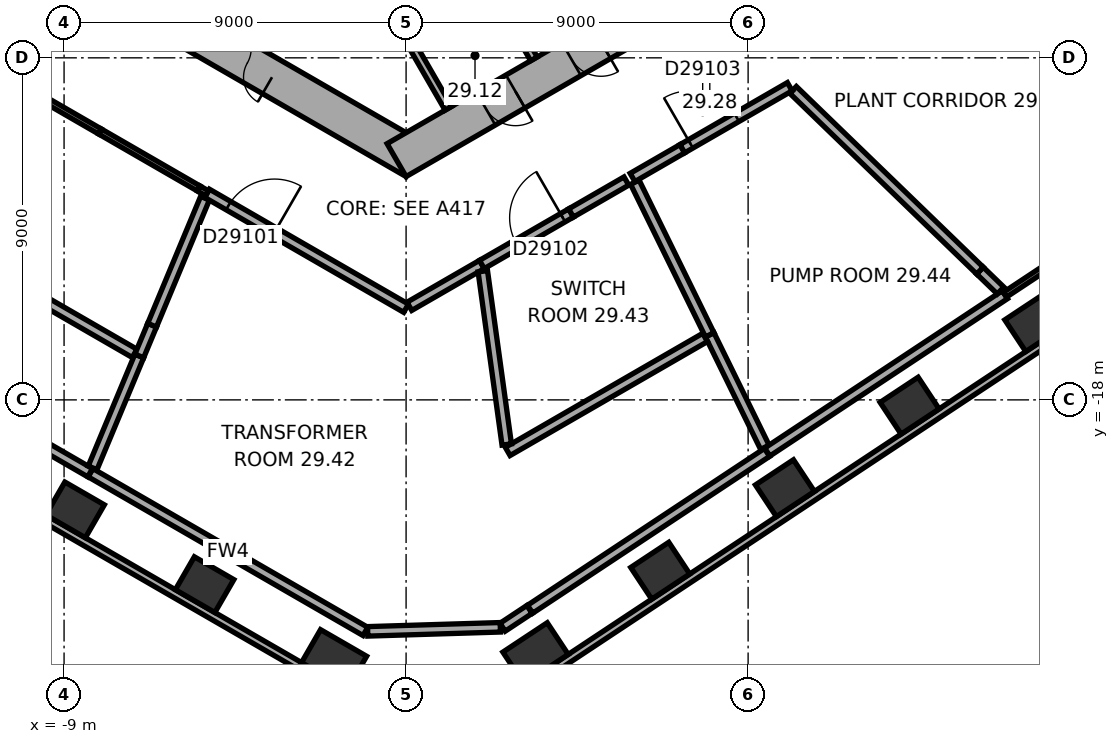
"""IFC4 building model, lengths in metres.
Left out: names, types, materials, properties, quantities, classifications, styles, units other than length and angle.
Written with IfcOpenShell. Run it as: python <this file> out.ifc"""

import sys

from ifc_helpers import new_model, si_unit, direction, frame, frame_2d, origin, origin_2d, place, context, subcontext, project, spatial, rectangle, extrude, element, fill, save


model = new_model("IFC4")
c1 = context("Model", 3, precision=1e-05, world=origin(), true_north=direction((0.0, 1.0)))
c2 = subcontext(c1, "Body", "Model", "MODEL_VIEW")
j1 = project(units=[si_unit("LENGTHUNIT", "METRE"), si_unit("PLANEANGLEUNIT", "RADIAN")], contexts=[c1])
p1 = place(None, origin())
s1 = spatial("IfcSite", under=j1, at=p1, CompositionType="ELEMENT")
p2 = place(p1, origin())
s2 = spatial("IfcBuilding", under=s1, at=p2, CompositionType="ELEMENT")
p3 = place(p2, frame((0.0, 0.0, 119.9)))
s3 = spatial("IfcBuildingStorey", under=s2, at=p3, CompositionType="ELEMENT", Elevation=119.9)
for number, where, z_axis, x_axis in (
    (1, (-8.71, -20.895, 0.0), (0.0, 0.0, 1.0), (0.866, -0.5, 0.0)),
    (2, (-5.302, -22.862, 0.0), (0.0, 0.0, 1.0), (0.866, -0.5, 0.0)),
):
    element("IfcColumn", number, at=place(p3, frame(where, z_axis=z_axis, x_axis=x_axis)), inside=s3, PredefinedType="COLUMN", context=c2, shape_type="SweptSolid", body=[
        extrude(rectangle(XDim=1.2, YDim=1.0, at=origin_2d()), origin(), (0.0, 0.0, 1.0), 4.5),
    ])
for number, where, z_axis, x_axis in (
    (3, (-1.895, -24.829, 0.0), (0.0, 0.0, 1.0), (0.866, -0.5, 0.0)),
    (4, (3.407, -24.667, 0.0), (0.0, 0.0, 1.0), (0.834, 0.552, 0.0)),
):
    element("IfcColumn", number, at=place(p3, frame(where, z_axis=z_axis, x_axis=x_axis)), inside=s3, PredefinedType="COLUMN", context=c2, shape_type="SweptSolid", body=[
        extrude(rectangle(XDim=1.4, YDim=1.0, at=origin_2d()), origin(), (0.0, 0.0, 1.0), 4.5),
    ])
for number, where, z_axis, x_axis in (
    (5, (6.688, -22.496, 0.0), (0.0, 0.0, 1.0), (0.834, 0.552, 0.0)),
    (6, (9.969, -20.324, 0.0), (0.0, 0.0, 1.0), (0.834, 0.552, 0.0)),
    (7, (13.25, -18.152, 0.0), (0.0, 0.0, 1.0), (0.834, 0.552, 0.0)),
    (8, (16.531, -15.981, 0.0), (0.0, 0.0, 1.0), (0.834, 0.552, 0.0)),
):
    element("IfcColumn", number, at=place(p3, frame(where, z_axis=z_axis, x_axis=x_axis)), inside=s3, PredefinedType="COLUMN", context=c2, shape_type="SweptSolid", body=[
        extrude(rectangle(XDim=1.2, YDim=1.0, at=origin_2d()), origin(), (0.0, 0.0, 1.0), 4.5),
    ])
p4 = place(p3, frame((-10.25, -5.629, 0.0), z_axis=(0.0, 0.0, 1.0), x_axis=(0.866022616891, -0.50000482701, 0.0)))
e9 = element("IfcWall", 9, at=p4, inside=s3, PredefinedType="SHEAR", context=c2, shape_type="SweptSolid", body=[
    extrude(rectangle(XDim=12.125, YDim=1.0, at=frame_2d((6.062, 0.0))), origin(), (0.0, 0.0, 1.0), 4.5),
])
p5 = place(p4, frame((6.262, 0.0, 0.0)))
e10 = element("IfcOpeningElement", 10, at=p5, cuts=e9, PredefinedType="OPENING", context=c2, shape_type="SweptSolid", body=[
    extrude(rectangle(XDim=1.5, YDim=2.1, at=frame_2d((0.75, 1.05))), frame((0.0, 0.51, 0.0), z_axis=(0.0, -1.0, 0.0), x_axis=(1.0, 0.0, 0.0)), (0.0, 0.0, 1.0), 1.02),
])
p6 = place(p4, frame((3.112, 0.0, 0.0)))
e11 = element("IfcOpeningElement", 11, at=p6, cuts=e9, PredefinedType="OPENING", context=c2, shape_type="SweptSolid", body=[
    extrude(rectangle(XDim=0.9, YDim=2.1, at=frame_2d((0.45, 1.05))), frame((0.0, 0.51, 0.0), z_axis=(0.0, -1.0, 0.0), x_axis=(1.0, 0.0, 0.0)), (0.0, 0.0, 1.0), 1.02),
])
p7 = place(p3, frame((-0.25, -11.691, 0.0), z_axis=(0.0, 0.0, 1.0), x_axis=(0.866022616891, 0.50000482701, 0.0)))
e12 = element("IfcWall", 12, at=p7, inside=s3, PredefinedType="SHEAR", context=c2, shape_type="SweptSolid", body=[
    extrude(rectangle(XDim=12.125, YDim=1.0, at=frame_2d((6.062, 0.0))), origin(), (0.0, 0.0, 1.0), 4.5),
])
p8 = place(p7, frame((2.712, 0.0, 0.0)))
e13 = element("IfcOpeningElement", 13, at=p8, cuts=e12, PredefinedType="OPENING", context=c2, shape_type="SweptSolid", body=[
    extrude(rectangle(XDim=0.9, YDim=2.1, at=frame_2d((0.45, 1.05))), frame((0.0, 0.51, 0.0), z_axis=(0.0, -1.0, 0.0), x_axis=(1.0, 0.0, 0.0)), (0.0, 0.0, 1.0), 1.02),
])
p9 = place(p7, frame((5.312, 0.0, 0.0)))
e14 = element("IfcOpeningElement", 14, at=p9, cuts=e12, PredefinedType="OPENING", context=c2, shape_type="SweptSolid", body=[
    extrude(rectangle(XDim=0.9, YDim=2.1, at=frame_2d((0.45, 1.05))), frame((0.0, 0.51, 0.0), z_axis=(0.0, -1.0, 0.0), x_axis=(1.0, 0.0, 0.0)), (0.0, 0.0, 1.0), 1.02),
])
p10 = place(p7, frame((7.812, 0.0, 0.0)))
e15 = element("IfcOpeningElement", 15, at=p10, cuts=e12, PredefinedType="OPENING", context=c2, shape_type="SweptSolid", body=[
    extrude(rectangle(XDim=1.1, YDim=2.1, at=frame_2d((0.55, 1.05))), frame((0.0, 0.51, 0.0), z_axis=(0.0, -1.0, 0.0), x_axis=(1.0, 0.0, 0.0)), (0.0, 0.0, 1.0), 1.02),
])
for number, where, z_axis, x_axis in (
    (16, (-19.914, -15.119, 0.0), (0.0, 0.0, 1.0), (0.866, -0.5, 0.0)),
    (17, (3.083, -25.601, 0.0), (0.0, 0.0, 1.0), (0.834, 0.552, 0.0)),
):
    element("IfcWall", number, at=place(p3, frame(where, z_axis=z_axis, x_axis=x_axis)), inside=s3, PredefinedType="STANDARD", context=c2, shape_type="SweptSolid", body=[
        extrude(rectangle(XDim=21.246, YDim=0.2, at=frame_2d((10.623, 0.0))), origin(), (0.0, 0.0, 1.0), 4.5),
    ])
for number, where, z_axis, x_axis in (
    (18, (0.013, -8.422, 0.0), (0.0, 0.0, 1.0), (0.5, -0.866, 0.0)),
    (19, (2.264, -7.122, 0.0), (0.0, 0.0, 1.0), (0.5, -0.866, 0.0)),
):
    element("IfcWall", number, at=place(p3, frame(where, z_axis=z_axis, x_axis=x_axis)), inside=s3, PredefinedType="PARTITIONING", context=c2, shape_type="SweptSolid", body=[
        extrude(rectangle(XDim=2.2, YDim=0.2, at=frame_2d((1.1, 0.0))), origin(), (0.0, 0.0, 1.0), 4.22),
    ])
p11 = place(p3, frame((-1.071, -24.093, 0.0), z_axis=(0.0, 0.0, 1.0), x_axis=(-0.866026859388, 0.499997478812, 0.0)))
e20 = element("IfcWall", 20, at=p11, inside=s3, PredefinedType="SOLIDWALL", context=c2, shape_type="SweptSolid", body=[
    extrude(rectangle(XDim=8.35, YDim=0.25, at=frame_2d((4.175, 0.0))), origin(), (0.0, 0.0, 1.0), 3.72),
])
p12 = place(p3, frame((2.479, -23.984, 0.0), z_axis=(0.0, 0.0, 1.0), x_axis=(-0.999533191385, -0.030551584573, 0.0)))
e21 = element("IfcWall", 21, at=p12, inside=s3, PredefinedType="SOLIDWALL", context=c2, shape_type="SweptSolid", body=[
    extrude(rectangle(XDim=3.492, YDim=0.25, at=frame_2d((1.746, 0.0))), origin(), (0.0, 0.0, 1.0), 4.22),
])
p13 = place(p3, frame((3.248, -23.513, 0.0), z_axis=(0.0, 0.0, 1.0), x_axis=(-0.833947775338, -0.551843372715, 0.0)))
e22 = element("IfcWall", 22, at=p13, inside=s3, PredefinedType="SOLIDWALL", context=c2, shape_type="SweptSolid", body=[
    extrude(rectangle(XDim=0.849, YDim=0.25, at=frame_2d((0.424, 0.0))), origin(), (0.0, 0.0, 1.0), 4.22),
])
p14 = place(p3, frame((-8.315, -19.916, 0.0), z_axis=(0.0, 0.0, 1.0), x_axis=(-0.866035647186, 0.499982257488, 0.0)))
e23 = element("IfcWall", 23, at=p14, inside=s3, PredefinedType="SOLIDWALL", context=c2, shape_type="SweptSolid", body=[
    extrude(rectangle(XDim=11.226, YDim=0.25, at=frame_2d((5.613, 0.0))), origin(), (0.0, 0.0, 1.0), 3.72),
])
p15 = place(p3, frame((-8.249, -19.788, 0.0), z_axis=(0.0, 0.0, 1.0), x_axis=(0.384822050218, 0.922990785255, 0.0)))
e24 = element("IfcWall", 24, at=p15, inside=s3, PredefinedType="SOLIDWALL", context=c2, shape_type="SweptSolid", body=[
    extrude(rectangle(XDim=3.187, YDim=0.25, at=frame_2d((1.594, 0.0))), origin(), (0.0, 0.0, 1.0), 3.2),
])
p16 = place(p3, frame((9.498, -19.383, 0.0), z_axis=(0.0, 0.0, 1.0), x_axis=(-0.833904576857, -0.55190864887, 0.0)))
e25 = element("IfcWall", 25, at=p16, inside=s3, PredefinedType="SOLIDWALL", context=c2, shape_type="SweptSolid", body=[
    extrude(rectangle(XDim=7.476, YDim=0.25, at=frame_2d((3.738, 0.0))), origin(), (0.0, 0.0, 1.0), 3.72),
])
p17 = place(p3, frame((9.441, -19.248, 0.0), z_axis=(0.0, 0.0, 1.0), x_axis=(-0.440358551841, 0.89782200119, 0.0)))
e26 = element("IfcWall", 26, at=p17, inside=s3, PredefinedType="SOLIDWALL", context=c2, shape_type="SweptSolid", body=[
    extrude(rectangle(XDim=3.297, YDim=0.25, at=frame_2d((1.648, 0.0))), origin(), (0.0, 0.0, 1.0), 3.2),
])
p18 = place(p3, frame((-7.143, -16.776, 0.0), z_axis=(0.0, 0.0, 1.0), x_axis=(-0.866010407637, 0.500025973189, 0.0)))
e27 = element("IfcWall", 27, at=p18, inside=s3, PredefinedType="SOLIDWALL", context=c2, shape_type="SweptSolid", body=[
    extrude(rectangle(XDim=9.376, YDim=0.25, at=frame_2d((4.688, 0.0))), origin(), (0.0, 0.0, 1.0), 4.22),
])
p19 = place(p3, frame((7.868, -16.358, 0.0), z_axis=(0.0, 0.0, 1.0), x_axis=(-0.866027641919, -0.499996123417, 0.0)))
e28 = element("IfcWall", 28, at=p19, inside=s3, PredefinedType="SOLIDWALL", context=c2, shape_type="SweptSolid", body=[
    extrude(rectangle(XDim=5.998, YDim=0.25, at=frame_2d((2.999, 0.0))), origin(), (0.0, 0.0, 1.0), 4.22),
])
p20 = place(p3, frame((7.989, -16.287, 0.0), z_axis=(0.0, 0.0, 1.0), x_axis=(-0.440340265272, 0.89783097005, 0.0)))
e29 = element("IfcWall", 29, at=p20, inside=s3, PredefinedType="SOLIDWALL", context=c2, shape_type="SweptSolid", body=[
    extrude(rectangle(XDim=4.47, YDim=0.25, at=frame_2d((2.235, 0.0))), origin(), (0.0, 0.0, 1.0), 3.2),
])
p21 = place(p3, frame((-6.684, -16.034, 0.0), z_axis=(0.0, 0.0, 1.0), x_axis=(-0.384892223144, -0.922961524964, 0.0)))
e30 = element("IfcWall", 30, at=p21, inside=s3, PredefinedType="SOLIDWALL", context=c2, shape_type="SweptSolid", body=[
    extrude(rectangle(XDim=0.877, YDim=0.25, at=frame_2d((0.438, 0.0))), origin(), (0.0, 0.0, 1.0), 3.2),
])
p22 = place(p3, frame((-6.684, -16.034, 0.0), z_axis=(0.0, 0.0, 1.0), x_axis=(0.384715971376, 0.923035005495, 0.0)))
e31 = element("IfcWall", 31, at=p22, inside=s3, PredefinedType="SOLIDWALL", context=c2, shape_type="SweptSolid", body=[
    extrude(rectangle(XDim=3.619, YDim=0.25, at=frame_2d((1.81, 0.0))), origin(), (0.0, 0.0, 1.0), 3.2),
])
p23 = place(p3, frame((0.0, -15.588, 0.0), z_axis=(0.0, 0.0, 1.0), x_axis=(-0.866023574055, 0.500003169172, 0.0)))
e32 = element("IfcWall", 32, at=p23, inside=s3, PredefinedType="SOLIDWALL", context=c2, shape_type="SweptSolid", body=[
    extrude(rectangle(XDim=6.048, YDim=0.25, at=frame_2d((3.024, 0.0))), origin(), (0.0, 0.0, 1.0), 4.22),
])
p24 = place(p23, frame((3.998, 0.0, 0.0)))
e33 = element("IfcOpeningElement", 33, at=p24, cuts=e32, PredefinedType="OPENING", context=c2, shape_type="SweptSolid", body=[
    extrude(rectangle(XDim=1.4, YDim=2.1, at=frame_2d((0.7, 1.05))), frame((0.0, 0.135, 0.0), z_axis=(0.0, -1.0, 0.0), x_axis=(1.0, 0.0, 0.0)), (0.0, 0.0, 1.0), 0.27),
])
p25 = place(p3, frame((0.087, -15.539, 0.0), z_axis=(0.0, 0.0, 1.0), x_axis=(0.866037899034, 0.499978356969, 0.0)))
e34 = element("IfcWall", 34, at=p25, inside=s3, PredefinedType="SOLIDWALL", context=c2, shape_type="SweptSolid", body=[
    extrude(rectangle(XDim=2.202, YDim=0.25, at=frame_2d((1.101, 0.0))), origin(), (0.0, 0.0, 1.0), 4.22),
])
p26 = place(p3, frame((15.758, -15.233, 0.0), z_axis=(0.0, 0.0, 1.0), x_axis=(-0.83385397802, -0.551985093403, 0.0)))
e35 = element("IfcWall", 35, at=p26, inside=s3, PredefinedType="SOLIDWALL", context=c2, shape_type="SweptSolid", body=[
    extrude(rectangle(XDim=7.499, YDim=0.25, at=frame_2d((3.75, 0.0))), origin(), (0.0, 0.0, 1.0), 3.72),
])
p27 = place(p3, frame((2.019, -14.616, 0.0), z_axis=(0.0, 0.0, 1.0), x_axis=(0.136895946059, -0.99058543294, 0.0)))
e36 = element("IfcWall", 36, at=p27, inside=s3, PredefinedType="SOLIDWALL", context=c2, shape_type="SweptSolid", body=[
    extrude(rectangle(XDim=4.601, YDim=0.25, at=frame_2d((2.301, 0.0))), origin(), (0.0, 0.0, 1.0), 3.2),
])
p28 = place(p3, frame((15.101, -14.598, 0.0), z_axis=(0.0, 0.0, 1.0), x_axis=(0.718831874795, -0.695183958229, 0.0)))
e37 = element("IfcWall", 37, at=p28, inside=s3, PredefinedType="SOLIDWALL", context=c2, shape_type="SweptSolid", body=[
    extrude(rectangle(XDim=0.754, YDim=0.25, at=frame_2d((0.377, 0.0))), origin(), (0.0, 0.0, 1.0), 3.2),
])
p29 = place(p3, frame((15.101, -14.598, 0.0), z_axis=(0.0, 0.0, 1.0), x_axis=(-0.718943789633, 0.695068217766, 0.0)))
e38 = element("IfcWall", 38, at=p29, inside=s3, PredefinedType="SOLIDWALL", context=c2, shape_type="SweptSolid", body=[
    extrude(rectangle(XDim=6.841, YDim=0.25, at=frame_2d((3.42, 0.0))), origin(), (0.0, 0.0, 1.0), 3.2),
])
p30 = place(p3, frame((4.341, -13.083, 0.0), z_axis=(0.0, 0.0, 1.0), x_axis=(-0.866028061811, -0.499995396135, 0.0)))
e39 = element("IfcWall", 39, at=p30, inside=s3, PredefinedType="SOLIDWALL", context=c2, shape_type="SweptSolid", body=[
    extrude(rectangle(XDim=2.71, YDim=0.25, at=frame_2d((1.355, 0.0))), origin(), (0.0, 0.0, 1.0), 4.22),
])
p31 = place(p30, frame((0.25, 0.0, 0.0)))
e40 = element("IfcOpeningElement", 40, at=p31, cuts=e39, PredefinedType="OPENING", context=c2, shape_type="SweptSolid", body=[
    extrude(rectangle(XDim=1.4, YDim=2.1, at=frame_2d((0.7, 1.05))), frame((0.0, 0.135, 0.0), z_axis=(0.0, -1.0, 0.0), x_axis=(1.0, 0.0, 0.0)), (0.0, 0.0, 1.0), 0.27),
])
p32 = place(p3, frame((19.563, -12.714, 0.0), z_axis=(0.0, 0.0, 1.0), x_axis=(-0.833913741114, -0.551894801916, 0.0)))
e41 = element("IfcWall", 41, at=p32, inside=s3, PredefinedType="PARTITIONING", context=c2, shape_type="SweptSolid", body=[
    extrude(rectangle(XDim=4.564, YDim=0.15, at=frame_2d((2.282, 0.0))), origin(), (0.0, 0.0, 1.0), 3.72),
])
p33 = place(p3, frame((-5.238, -12.564, 0.0), z_axis=(0.0, 0.0, 1.0), x_axis=(-0.866234801039, 0.4996371378, 0.0)))
e42 = element("IfcWall", 42, at=p33, inside=s3, PredefinedType="PARTITIONING", context=c2, shape_type="SweptSolid", body=[
    extrude(rectangle(XDim=0.248, YDim=0.15, at=frame_2d((0.124, 0.0))), origin(), (0.0, 0.0, 1.0), 4.22),
])
p34 = place(p3, frame((-5.452, -12.441, 0.0), z_axis=(0.0, 0.0, 1.0), x_axis=(-0.866037998184, 0.499978185225, 0.0)))
e43 = element("IfcWall", 43, at=p34, inside=s3, PredefinedType="PARTITIONING", context=c2, shape_type="SweptSolid", body=[
    extrude(rectangle(XDim=3.003, YDim=0.15, at=frame_2d((1.501, 0.0))), origin(), (0.0, 0.0, 1.0), 4.22),
])
p35 = place(p3, frame((5.797, -12.241, 0.0), z_axis=(0.0, 0.0, 1.0), x_axis=(-0.865955892764, -0.500120377296, 0.0)))
e44 = element("IfcWall", 44, at=p35, inside=s3, PredefinedType="SOLIDWALL", context=c2, shape_type="SweptSolid", body=[
    extrude(rectangle(XDim=1.682, YDim=0.25, at=frame_2d((0.841, 0.0))), origin(), (0.0, 0.0, 1.0), 4.22),
])
p36 = place(p3, frame((5.958, -12.148, 0.0), z_axis=(0.0, 0.0, 1.0), x_axis=(0.866080830997, 0.499903984961, 0.0)))
e45 = element("IfcWall", 45, at=p36, inside=s3, PredefinedType="SOLIDWALL", context=c2, shape_type="SweptSolid", body=[
    extrude(rectangle(XDim=1.513, YDim=0.25, at=frame_2d((0.757, 0.0))), origin(), (0.0, 0.0, 1.0), 4.22),
])
p37 = place(p3, frame((7.269, -11.391, 0.0), z_axis=(0.0, 0.0, 1.0), x_axis=(0.866043587326, 0.49996850386, 0.0)))
e46 = element("IfcWall", 46, at=p37, inside=s3, PredefinedType="SOLIDWALL", context=c2, shape_type="SweptSolid", body=[
    extrude(rectangle(XDim=3.264, YDim=0.25, at=frame_2d((1.632, 0.0))), origin(), (0.0, 0.0, 1.0), 4.22),
])
p38 = place(p37, frame((0.25, 0.0, 0.0)))
e47 = element("IfcOpeningElement", 47, at=p38, cuts=e46, PredefinedType="OPENING", context=c2, shape_type="SweptSolid", body=[
    extrude(rectangle(XDim=1.4, YDim=2.1, at=frame_2d((0.7, 1.05))), frame((0.0, 0.135, 0.0), z_axis=(0.0, -1.0, 0.0), x_axis=(1.0, 0.0, 0.0)), (0.0, 0.0, 1.0), 0.27),
])
p39 = place(p3, frame((-8.052, -10.939, 0.0), z_axis=(0.0, 0.0, 1.0), x_axis=(-0.865989037086, 0.500062983681, 0.0)))
e48 = element("IfcWall", 48, at=p39, inside=s3, PredefinedType="PARTITIONING", context=c2, shape_type="SweptSolid", body=[
    extrude(rectangle(XDim=3.848, YDim=0.15, at=frame_2d((1.924, 0.0))), origin(), (0.0, 0.0, 1.0), 4.22),
])
p40 = place(p39, frame((2.598, 0.0, 0.0)))
e49 = element("IfcOpeningElement", 49, at=p40, cuts=e48, PredefinedType="OPENING", context=c2, shape_type="SweptSolid", body=[
    extrude(rectangle(XDim=1.0, YDim=2.1, at=frame_2d((0.5, 1.05))), frame((0.0, 0.085, 0.0), z_axis=(0.0, -1.0, 0.0), x_axis=(1.0, 0.0, 0.0)), (0.0, 0.0, 1.0), 0.17),
])
p41 = place(p5, origin())
e50 = element("IfcDoor", 50, at=p41, inside=s3, OperationType="DOUBLE_DOOR_SINGLE_SWING", PredefinedType="DOOR", context=c2, shape_type="SweptSolid", body=[
    extrude(rectangle(XDim=1.5, YDim=2.1, at=frame_2d((0.75, 1.05))), frame((0.0, 0.025, 0.0), z_axis=(0.0, -1.0, 0.0), x_axis=(1.0, 0.0, 0.0)), (0.0, 0.0, 1.0), 0.05),
])
fill(e10, e50)
p42 = place(p8, origin())
e51 = element("IfcDoor", 51, at=p42, inside=s3, OperationType="SINGLE_SWING_LEFT", PredefinedType="DOOR", context=c2, shape_type="SweptSolid", body=[
    extrude(rectangle(XDim=0.9, YDim=2.1, at=frame_2d((0.45, 1.05))), frame((0.0, 0.025, 0.0), z_axis=(0.0, -1.0, 0.0), x_axis=(1.0, 0.0, 0.0)), (0.0, 0.0, 1.0), 0.05),
])
fill(e13, e51)
p43 = place(p9, origin())
e52 = element("IfcDoor", 52, at=p43, inside=s3, OperationType="SINGLE_SWING_LEFT", PredefinedType="DOOR", context=c2, shape_type="SweptSolid", body=[
    extrude(rectangle(XDim=0.9, YDim=2.1, at=frame_2d((0.45, 1.05))), frame((0.0, 0.025, 0.0), z_axis=(0.0, -1.0, 0.0), x_axis=(1.0, 0.0, 0.0)), (0.0, 0.0, 1.0), 0.05),
])
fill(e14, e52)
p44 = place(p24, origin())
e53 = element("IfcDoor", 53, at=p44, inside=s3, OperationType="SINGLE_SWING_LEFT", PredefinedType="DOOR", context=c2, shape_type="SweptSolid", body=[
    extrude(rectangle(XDim=1.4, YDim=2.1, at=frame_2d((0.7, 1.05))), frame((0.0, 0.025, 0.0), z_axis=(0.0, -1.0, 0.0), x_axis=(1.0, 0.0, 0.0)), (0.0, 0.0, 1.0), 0.05),
])
fill(e33, e53)
p45 = place(p31, origin())
e54 = element("IfcDoor", 54, at=p45, inside=s3, OperationType="SINGLE_SWING_LEFT", PredefinedType="DOOR", context=c2, shape_type="SweptSolid", body=[
    extrude(rectangle(XDim=1.4, YDim=2.1, at=frame_2d((0.7, 1.05))), frame((0.0, 0.025, 0.0), z_axis=(0.0, -1.0, 0.0), x_axis=(1.0, 0.0, 0.0)), (0.0, 0.0, 1.0), 0.05),
])
fill(e40, e54)
p46 = place(p38, origin())
e55 = element("IfcDoor", 55, at=p46, inside=s3, OperationType="SINGLE_SWING_LEFT", PredefinedType="DOOR", context=c2, shape_type="SweptSolid", body=[
    extrude(rectangle(XDim=1.4, YDim=2.1, at=frame_2d((0.7, 1.05))), frame((0.0, 0.025, 0.0), z_axis=(0.0, -1.0, 0.0), x_axis=(1.0, 0.0, 0.0)), (0.0, 0.0, 1.0), 0.05),
])
fill(e47, e55)
save(model, sys.argv[1])
